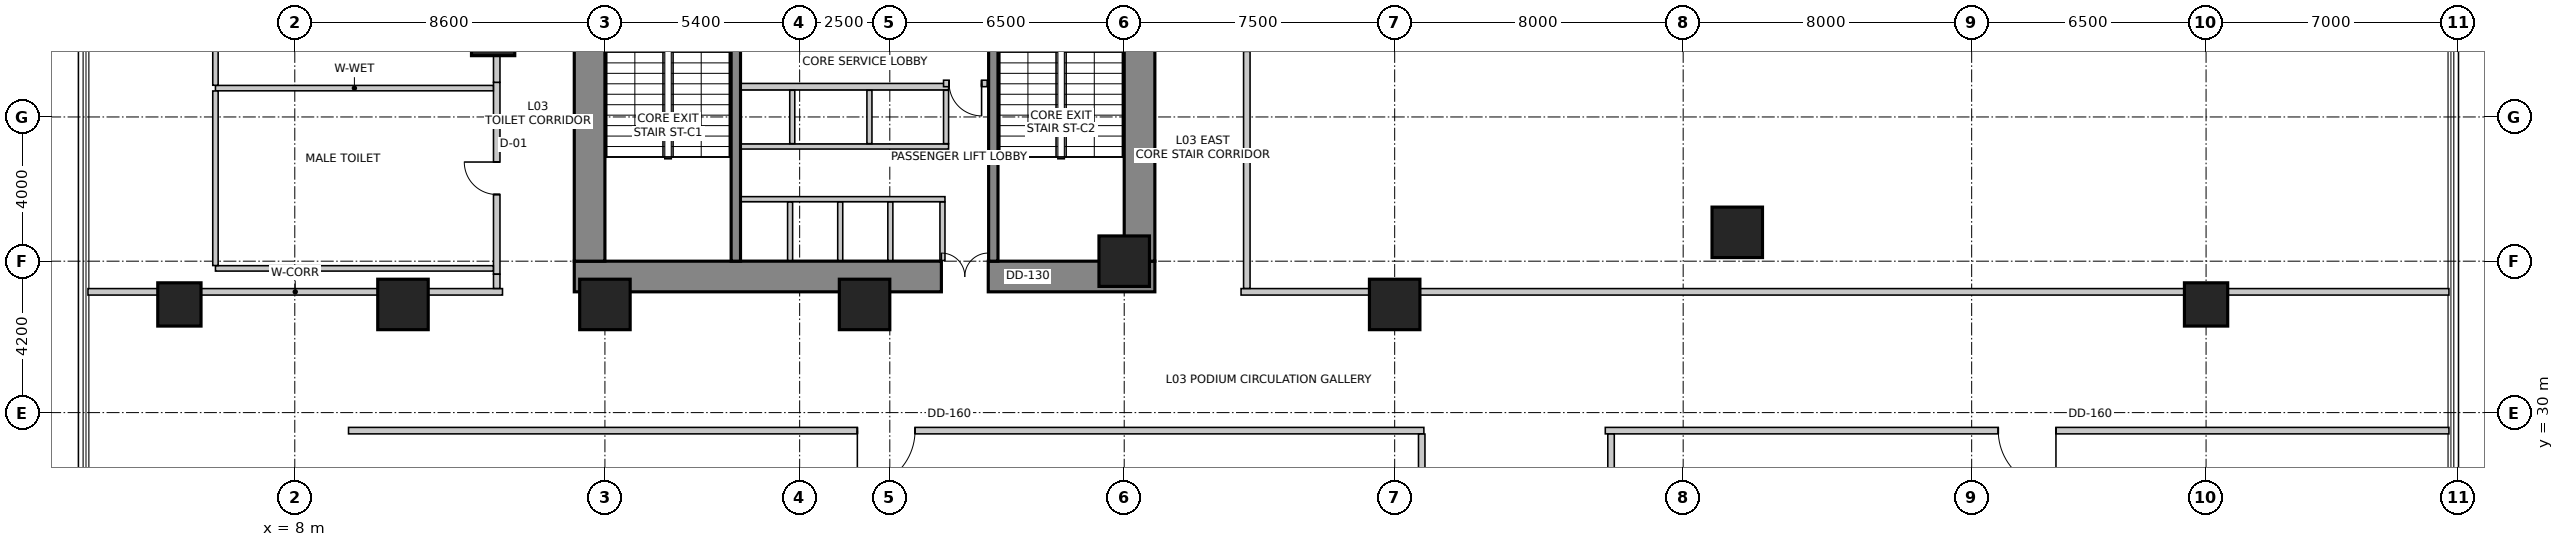
"""IFC4 building model, lengths in metres.
Left out: names, types, materials, properties, quantities, classifications, styles, units other than length and angle.
Written with IfcOpenShell. Run it as: python <this file> out.ifc"""

import sys

from ifc_helpers import new_model, si_unit, direction, frame, frame_2d, origin, origin_2d, place, context, subcontext, project, spatial, rectangle, extrude, source, transform, mapped, element, fill, save


model = new_model("IFC4")
c1 = context("Model", 3, precision=1e-05, world=origin(), true_north=direction((0.0, 1.0)))
c2 = subcontext(c1, "Body", "Model", "MODEL_VIEW")
j1 = project(units=[si_unit("LENGTHUNIT", "METRE"), si_unit("PLANEANGLEUNIT", "RADIAN")], contexts=[c1])
p1 = place(None, origin())
s1 = spatial("IfcSite", under=j1, at=p1, CompositionType="ELEMENT")
p2 = place(p1, origin())
s2 = spatial("IfcBuilding", under=s1, at=p2, CompositionType="ELEMENT")
p3 = place(p2, frame((0.0, 0.0, 11.2)))
s3 = spatial("IfcBuildingStorey", under=s2, at=p3, CompositionType="ELEMENT", Elevation=11.2)
p4 = place(p3, frame((15.75, 33.775, 0.0), z_axis=(0.0, 0.0, 1.0), x_axis=(1.0, 0.0, 0.0)))
e1 = element("IfcWall", 1, at=p4, inside=s3, PredefinedType="SHEAR", context=c2, shape_type="SweptSolid", body=[
    extrude(rectangle(XDim=16.1, YDim=0.85, at=frame_2d((8.05, 0.0))), origin(), (0.0, 0.0, 1.0), 5.2),
])
m1 = source(origin(), c2, "Body", "SweptSolid", [
    extrude(rectangle(XDim=1.3, YDim=2.15, at=frame_2d((0.65, 1.075))), frame((0.0, 0.435, 0.0), z_axis=(0.0, -1.0, 0.0), x_axis=(1.0, 0.0, 0.0)), (0.0, 0.0, 1.0), 0.87),
])
p5 = place(p4, frame((10.18, 0.0, 0.0)))
e2 = element("IfcOpeningElement", 2, at=p5, cuts=e1, PredefinedType="OPENING", context=c2, shape_type="MappedRepresentation", body=[
    mapped(m1, transform((0.0, 0.0, 0.0), scale=1.0)),
])
p6 = place(p3, frame((16.175, 34.2, 0.0), z_axis=(0.0, 0.0, 1.0), x_axis=(0.0, 1.0, 0.0)))
e3 = element("IfcWall", 3, at=p6, inside=s3, PredefinedType="SHEAR", context=c2, shape_type="SweptSolid", body=[
    extrude(rectangle(XDim=11.4, YDim=0.85, at=frame_2d((5.7, 0.0))), origin(), (0.0, 0.0, 1.0), 5.2),
])
m2 = source(origin(), c2, "Body", "SweptSolid", [
    extrude(rectangle(XDim=1.1, YDim=2.15, at=frame_2d((0.55, 1.075))), frame((0.0, 0.435, 0.0), z_axis=(0.0, -1.0, 0.0), x_axis=(1.0, 0.0, 0.0)), (0.0, 0.0, 1.0), 0.87),
])
p7 = place(p6, frame((7.15, 0.0, 0.0)))
e4 = element("IfcOpeningElement", 4, at=p7, cuts=e3, PredefinedType="OPENING", context=c2, shape_type="MappedRepresentation", body=[
    mapped(m2, transform((0.0, 0.0, 0.0), scale=1.0)),
])
p8 = place(p3, frame((31.425, 34.2, 0.0), z_axis=(0.0, 0.0, 1.0), x_axis=(0.0, 1.0, 0.0)))
e5 = element("IfcWall", 5, at=p8, inside=s3, PredefinedType="SHEAR", context=c2, shape_type="SweptSolid", body=[
    extrude(rectangle(XDim=11.4, YDim=0.85, at=frame_2d((5.7, 0.0))), origin(), (0.0, 0.0, 1.0), 5.2),
])
p9 = place(p8, frame((7.35, 0.0, 0.0)))
e6 = element("IfcOpeningElement", 6, at=p9, cuts=e5, PredefinedType="OPENING", context=c2, shape_type="MappedRepresentation", body=[
    mapped(m2, transform((0.0, 0.0, 0.0), scale=1.0)),
])
p10 = place(p3, frame((20.23, 34.2, 0.0), z_axis=(0.0, 0.0, 1.0), x_axis=(0.0, 1.0, 0.0)))
e7 = element("IfcWall", 7, at=p10, inside=s3, PredefinedType="SHEAR", context=c2, shape_type="SweptSolid", body=[
    extrude(rectangle(XDim=9.06, YDim=0.26, at=frame_2d((4.53, 0.0))), origin(), (0.0, 0.0, 1.0), 5.2),
])
m3 = source(origin(), c2, "Body", "SweptSolid", [
    extrude(rectangle(XDim=1.1, YDim=2.15, at=frame_2d((0.55, 1.075))), frame((0.0, 0.14, 0.0), z_axis=(0.0, -1.0, 0.0), x_axis=(1.0, 0.0, 0.0)), (0.0, 0.0, 1.0), 0.28),
])
p11 = place(p10, frame((7.45, 0.0, 0.0)))
e8 = element("IfcOpeningElement", 8, at=p11, cuts=e7, PredefinedType="OPENING", context=c2, shape_type="MappedRepresentation", body=[
    mapped(m3, transform((0.0, 0.0, 0.0), scale=1.0)),
])
p12 = place(p3, frame((27.37, 34.2, 0.0), z_axis=(0.0, 0.0, 1.0), x_axis=(0.0, 1.0, 0.0)))
e9 = element("IfcWall", 9, at=p12, inside=s3, PredefinedType="SHEAR", context=c2, shape_type="SweptSolid", body=[
    extrude(rectangle(XDim=9.06, YDim=0.26, at=frame_2d((4.53, 0.0))), origin(), (0.0, 0.0, 1.0), 5.2),
])
p13 = place(p12, frame((7.45, 0.0, 0.0)))
e10 = element("IfcOpeningElement", 10, at=p13, cuts=e9, PredefinedType="OPENING", context=c2, shape_type="MappedRepresentation", body=[
    mapped(m3, transform((0.0, 0.0, 0.0), scale=1.0)),
])
m4 = source(origin(), c2, "Body", "SweptSolid", [
    extrude(rectangle(XDim=1.2, YDim=1.2, at=origin_2d()), origin(), (0.0, 0.0, 1.0), 5.2),
])
p14 = place(p3, frame((4.8, 33.0, 0.0), z_axis=(0.0, 0.0, 1.0), x_axis=(1.0, 0.0, 0.0)))
e11 = element("IfcColumn", 11, at=p14, inside=s3, PredefinedType="COLUMN", context=c2, shape_type="MappedRepresentation", body=[
    mapped(m4, transform((0.0, 0.0, 0.0), scale=1.0)),
])
m5 = source(origin(), c2, "Body", "SweptSolid", [
    extrude(rectangle(XDim=1.4, YDim=1.4, at=origin_2d()), origin(), (0.0, 0.0, 1.0), 5.2),
])
for number, where, z_axis, x_axis in (
    (12, (11.0, 33.0, 0.0), (0.0, 0.0, 1.0), (1.0, 0.0, 0.0)),
    (13, (16.6, 33.0, 0.0), (0.0, 0.0, 1.0), (1.0, 0.0, 0.0)),
    (14, (23.8, 33.0, 0.0), (0.0, 0.0, 1.0), (1.0, 0.0, 0.0)),
    (15, (31.0, 34.2, 0.0), (0.0, 0.0, 1.0), (1.0, 0.0, 0.0)),
    (16, (38.5, 33.0, 0.0), (0.0, 0.0, 1.0), (1.0, 0.0, 0.0)),
    (17, (48.0, 35.0, 0.0), (0.0, 0.0, 1.0), (1.0, 0.0, 0.0)),
):
    element("IfcColumn", number, at=place(p3, frame(where, z_axis=z_axis, x_axis=x_axis)), inside=s3, PredefinedType="COLUMN", context=c2, shape_type="MappedRepresentation", body=[
        mapped(m5, transform((0.0, 0.0, 0.0), scale=1.0)),
    ])
for number, where, z_axis, x_axis in (
    (18, (61.0, 33.0, 0.0), (0.0, 0.0, 1.0), (1.0, 0.0, 0.0)),
    (19, (13.5, 40.5, 0.0), (0.0, 0.0, 1.0), (1.0, 0.0, 0.0)),
):
    element("IfcColumn", number, at=place(p3, frame(where, z_axis=z_axis, x_axis=x_axis)), inside=s3, PredefinedType="COLUMN", context=c2, shape_type="MappedRepresentation", body=[
        mapped(m4, transform((0.0, 0.0, 0.0), scale=1.0)),
    ])
p15 = place(p3, frame((20.38, 35.92, 0.0), z_axis=(0.0, 0.0, 1.0), x_axis=(1.0, 0.0, 0.0)))
e20 = element("IfcWall", 20, at=p15, inside=s3, PredefinedType="SOLIDWALL", context=c2, shape_type="SweptSolid", body=[
    extrude(rectangle(XDim=5.65, YDim=0.14, at=frame_2d((2.825, 0.0))), origin(), (0.0, 0.0, 1.0), 4.9),
])
for number, where, z_axis, x_axis in (
    (21, (25.96, 34.22, 0.0), (0.0, 0.0, 1.0), (0.0, 1.0, 0.0)),
    (22, (21.735, 34.22, 0.0), (0.0, 0.0, 1.0), (0.0, 1.0, 0.0)),
    (23, (23.125, 34.22, 0.0), (0.0, 0.0, 1.0), (0.0, 1.0, 0.0)),
    (24, (24.515, 34.22, 0.0), (0.0, 0.0, 1.0), (0.0, 1.0, 0.0)),
):
    element("IfcWall", number, at=place(p3, frame(where, z_axis=z_axis, x_axis=x_axis)), inside=s3, PredefinedType="SOLIDWALL", context=c2, shape_type="SweptSolid", body=[
        extrude(rectangle(XDim=1.62, YDim=0.14, at=frame_2d((0.81, 0.0))), origin(), (0.0, 0.0, 1.0), 4.9),
    ])
p16 = place(p3, frame((20.38, 37.38, 0.0), z_axis=(0.0, 0.0, 1.0), x_axis=(1.0, 0.0, 0.0)))
e25 = element("IfcWall", 25, at=p16, inside=s3, PredefinedType="SOLIDWALL", context=c2, shape_type="SweptSolid", body=[
    extrude(rectangle(XDim=5.75, YDim=0.14, at=frame_2d((2.875, 0.0))), origin(), (0.0, 0.0, 1.0), 4.9),
])
p17 = place(p3, frame((20.38, 39.04, 0.0), z_axis=(0.0, 0.0, 1.0), x_axis=(1.0, 0.0, 0.0)))
e26 = element("IfcWall", 26, at=p17, inside=s3, PredefinedType="SOLIDWALL", context=c2, shape_type="SweptSolid", body=[
    extrude(rectangle(XDim=5.75, YDim=0.18, at=frame_2d((2.875, 0.0))), origin(), (0.0, 0.0, 1.0), 4.9),
])
for number, where, z_axis, x_axis in (
    (27, (26.06, 37.46, 0.0), (0.0, 0.0, 1.0), (0.0, 1.0, 0.0)),
    (28, (21.795, 37.46, 0.0), (0.0, 0.0, 1.0), (0.0, 1.0, 0.0)),
    (29, (23.935, 37.46, 0.0), (0.0, 0.0, 1.0), (0.0, 1.0, 0.0)),
):
    element("IfcWall", number, at=place(p3, frame(where, z_axis=z_axis, x_axis=x_axis)), inside=s3, PredefinedType="SOLIDWALL", context=c2, shape_type="SweptSolid", body=[
        extrude(rectangle(XDim=1.48, YDim=0.14, at=frame_2d((0.74, 0.0))), origin(), (0.0, 0.0, 1.0), 4.9),
    ])
p18 = place(p3, frame((27.2, 39.13, 0.0), z_axis=(0.0, 0.0, 1.0), x_axis=(-1.0, 0.0, 0.0)))
e30 = element("IfcWall", 30, at=p18, inside=s3, PredefinedType="PARTITIONING", context=c2, shape_type="SweptSolid", body=[
    extrude(rectangle(XDim=1.21, YDim=0.18, at=frame_2d((0.605, 0.0))), origin(), (0.0, 0.0, 1.0), 4.9),
])
m6 = source(origin(), c2, "Body", "SweptSolid", [
    extrude(rectangle(XDim=0.9, YDim=2.15, at=frame_2d((0.45, 1.075))), frame((0.0, 0.1, 0.0), z_axis=(0.0, -1.0, 0.0), x_axis=(1.0, 0.0, 0.0)), (0.0, 0.0, 1.0), 0.2),
])
p19 = place(p18, frame((0.155, 0.0, 0.0)))
e31 = element("IfcOpeningElement", 31, at=p19, cuts=e30, PredefinedType="OPENING", context=c2, shape_type="MappedRepresentation", body=[
    mapped(m6, transform((0.0, 0.0, 0.0), scale=1.0)),
])
p20 = place(p3, frame((2.265, 33.35, 0.0), z_axis=(0.0, 0.0, 1.0), x_axis=(1.0, 0.0, 0.0)))
e32 = element("IfcWall", 32, at=p20, inside=s3, PredefinedType="PARTITIONING", context=c2, shape_type="SweptSolid", body=[
    extrude(rectangle(XDim=11.495, YDim=0.18, at=frame_2d((5.748, 0.0))), origin(), (0.0, 0.0, 1.0), 3.692),
])
p21 = place(p3, frame((39.31, 29.5, 0.0), z_axis=(0.0, 0.0, 1.0), x_axis=(-1.0, 0.0, 0.0)))
e33 = element("IfcWall", 33, at=p21, inside=s3, PredefinedType="PARTITIONING", context=c2, shape_type="SweptSolid", body=[
    extrude(rectangle(XDim=29.82, YDim=0.18, at=frame_2d((14.91, 0.0))), origin(), (0.0, 0.0, 1.0), 4.03),
])
m7 = source(origin(), c2, "Body", "SweptSolid", [
    extrude(rectangle(XDim=1.6, YDim=2.15, at=frame_2d((0.8, 1.075))), frame((0.0, 0.1, 0.0), z_axis=(0.0, -1.0, 0.0), x_axis=(1.0, 0.0, 0.0)), (0.0, 0.0, 1.0), 0.2),
])
p22 = place(p21, frame((14.11, 0.0, 0.0)))
e34 = element("IfcOpeningElement", 34, at=p22, cuts=e33, PredefinedType="OPENING", context=c2, shape_type="MappedRepresentation", body=[
    mapped(m7, transform((0.0, 0.0, 0.0), scale=1.0)),
])
p23 = place(p3, frame((67.735, 29.5, 0.0), z_axis=(0.0, 0.0, 1.0), x_axis=(-1.0, 0.0, 0.0)))
e35 = element("IfcWall", 35, at=p23, inside=s3, PredefinedType="PARTITIONING", context=c2, shape_type="SweptSolid", body=[
    extrude(rectangle(XDim=23.395, YDim=0.18, at=frame_2d((11.698, 0.0))), origin(), (0.0, 0.0, 1.0), 3.092),
])
p24 = place(p23, frame((10.897, 0.0, 0.0)))
e36 = element("IfcOpeningElement", 36, at=p24, cuts=e35, PredefinedType="OPENING", context=c2, shape_type="MappedRepresentation", body=[
    mapped(m7, transform((0.0, 0.0, 0.0), scale=1.0)),
])
p25 = place(p3, frame((34.24, 33.35, 0.0), z_axis=(0.0, 0.0, 1.0), x_axis=(1.0, 0.0, 0.0)))
e37 = element("IfcWall", 37, at=p25, inside=s3, PredefinedType="PARTITIONING", context=c2, shape_type="SweptSolid", body=[
    extrude(rectangle(XDim=33.495, YDim=0.18, at=frame_2d((16.748, 0.0))), origin(), (0.0, 0.0, 1.0), 3.092),
])
p26 = place(p3, frame((39.25, 14.52, 0.0), z_axis=(0.0, 0.0, 1.0), x_axis=(0.0, 1.0, 0.0)))
e38 = element("IfcWall", 38, at=p26, inside=s3, PredefinedType="PARTITIONING", context=c2, shape_type="SweptSolid", body=[
    extrude(rectangle(XDim=14.886, YDim=0.18, at=frame_2d((7.443, 0.0))), origin(), (0.0, 0.0, 1.0), 3.692),
])
p27 = place(p3, frame((44.5, 29.406, 0.0), z_axis=(0.0, 0.0, 1.0), x_axis=(0.0, -1.0, 0.0)))
e39 = element("IfcWall", 39, at=p27, inside=s3, PredefinedType="PARTITIONING", context=c2, shape_type="SweptSolid", body=[
    extrude(rectangle(XDim=15.006, YDim=0.18, at=frame_2d((7.503, 0.0))), origin(), (0.0, 0.0, 1.0), 3.692),
])
p28 = place(p3, frame((13.6, 33.84, 0.0), z_axis=(0.0, 0.0, 1.0), x_axis=(0.0, 1.0, 0.0)))
e40 = element("IfcWall", 40, at=p28, inside=s3, PredefinedType="PARTITIONING", context=c2, shape_type="SweptSolid", body=[
    extrude(rectangle(XDim=5.32, YDim=0.18, at=frame_2d((2.66, 0.0))), origin(), (0.0, 0.0, 1.0), 4.9),
])
p29 = place(p28, frame((2.21, 0.0, 0.0)))
e41 = element("IfcOpeningElement", 41, at=p29, cuts=e40, PredefinedType="OPENING", context=c2, shape_type="MappedRepresentation", body=[
    mapped(m6, transform((0.0, 0.0, 0.0), scale=1.0)),
])
p30 = place(p3, frame((13.6, 39.162, 0.0), z_axis=(0.0, 0.0, 1.0), x_axis=(0.0, 1.0, 0.0)))
e42 = element("IfcWall", 42, at=p30, inside=s3, PredefinedType="PARTITIONING", context=c2, shape_type="SweptSolid", body=[
    extrude(rectangle(XDim=4.998, YDim=0.18, at=frame_2d((2.499, 0.0))), origin(), (0.0, 0.0, 1.0), 3.942),
])
p31 = place(p30, frame((3.33, 0.0, 0.0)))
e43 = element("IfcOpeningElement", 43, at=p31, cuts=e42, PredefinedType="OPENING", context=c2, shape_type="MappedRepresentation", body=[
    mapped(m6, transform((0.0, 0.0, 0.0), scale=1.0)),
])
p32 = place(p3, frame((13.6, 33.444, 0.0), z_axis=(0.0, 0.0, 1.0), x_axis=(0.0, 1.0, 0.0)))
e44 = element("IfcWall", 44, at=p32, inside=s3, PredefinedType="PARTITIONING", context=c2, shape_type="SweptSolid", body=[
    extrude(rectangle(XDim=0.394, YDim=0.18, at=frame_2d((0.197, 0.0))), origin(), (0.0, 0.0, 1.0), 4.9),
])
p33 = place(p3, frame((34.4, 48.0, 0.0), z_axis=(0.0, 0.0, 1.0), x_axis=(0.0, -1.0, 0.0)))
e45 = element("IfcWall", 45, at=p33, inside=s3, PredefinedType="PARTITIONING", context=c2, shape_type="SweptSolid", body=[
    extrude(rectangle(XDim=14.556, YDim=0.18, at=frame_2d((7.278, 0.0))), origin(), (0.0, 0.0, 1.0), 3.942),
])
m8 = source(origin(), c2, "Body", "SweptSolid", [
    extrude(rectangle(XDim=1.4, YDim=2.15, at=frame_2d((0.7, 1.075))), frame((0.0, 0.1, 0.0), z_axis=(0.0, -1.0, 0.0), x_axis=(1.0, 0.0, 0.0)), (0.0, 0.0, 1.0), 0.2),
])
p34 = place(p33, frame((6.578, 0.0, 0.0)))
e46 = element("IfcOpeningElement", 46, at=p34, cuts=e45, PredefinedType="OPENING", context=c2, shape_type="MappedRepresentation", body=[
    mapped(m8, transform((0.0, 0.0, 0.0), scale=1.0)),
])
for number, where, z_axis, x_axis in (
    (47, (5.8, 39.0, 0.0), (0.0, 0.0, 1.0), (1.0, 0.0, 0.0)),
    (48, (13.506, 34.0, 0.0), (0.0, 0.0, 1.0), (-1.0, 0.0, 0.0)),
):
    element("IfcWall", number, at=place(p3, frame(where, z_axis=z_axis, x_axis=x_axis)), inside=s3, PredefinedType="PARTITIONING", context=c2, shape_type="SweptSolid", body=[
        extrude(rectangle(XDim=7.706, YDim=0.15, at=frame_2d((3.853, 0.0))), origin(), (0.0, 0.0, 1.0), 3.942),
    ])
p35 = place(p3, frame((5.8, 34.079, 0.0), z_axis=(0.0, 0.0, 1.0), x_axis=(0.0, 1.0, 0.0)))
e49 = element("IfcWall", 49, at=p35, inside=s3, PredefinedType="PARTITIONING", context=c2, shape_type="SweptSolid", body=[
    extrude(rectangle(XDim=4.842, YDim=0.15, at=frame_2d((2.421, 0.0))), origin(), (0.0, 0.0, 1.0), 4.9),
])
p36 = place(p3, frame((5.8, 39.079, 0.0), z_axis=(0.0, 0.0, 1.0), x_axis=(0.0, 1.0, 0.0)))
e50 = element("IfcWall", 50, at=p36, inside=s3, PredefinedType="PARTITIONING", context=c2, shape_type="SweptSolid", body=[
    extrude(rectangle(XDim=4.921, YDim=0.15, at=frame_2d((2.46, 0.0))), origin(), (0.0, 0.0, 1.0), 4.9),
])
m9 = source(origin(), c2, "Body", "SweptSolid", [
    extrude(rectangle(XDim=1.3, YDim=2.15, at=frame_2d((0.65, 1.075))), frame((0.0, 0.025, 0.0), z_axis=(0.0, -1.0, 0.0), x_axis=(1.0, 0.0, 0.0)), (0.0, 0.0, 1.0), 0.05),
])
p37 = place(p5, origin())
e51 = element("IfcDoor", 51, at=p37, inside=s3, OperationType="DOUBLE_DOOR_SINGLE_SWING", PredefinedType="DOOR", context=c2, shape_type="MappedRepresentation", body=[
    mapped(m9, transform((0.0, 0.0, 0.0), scale=1.0)),
])
fill(e2, e51)
m10 = source(origin(), c2, "Body", "SweptSolid", [
    extrude(rectangle(XDim=0.9, YDim=2.15, at=frame_2d((0.45, 1.075))), frame((0.0, 0.025, 0.0), z_axis=(0.0, -1.0, 0.0), x_axis=(1.0, 0.0, 0.0)), (0.0, 0.0, 1.0), 0.05),
])
p38 = place(p19, origin())
e52 = element("IfcDoor", 52, at=p38, inside=s3, OperationType="SINGLE_SWING_LEFT", PredefinedType="DOOR", context=c2, shape_type="MappedRepresentation", body=[
    mapped(m10, transform((0.0, 0.0, 0.0), scale=1.0)),
])
fill(e31, e52)
m11 = source(origin(), c2, "Body", "SweptSolid", [
    extrude(rectangle(XDim=0.9, YDim=2.15, at=frame_2d((0.45, 1.075))), frame((0.0, 0.025, 0.0), z_axis=(0.0, -1.0, 0.0), x_axis=(1.0, 0.0, 0.0)), (0.0, 0.0, 1.0), 0.05),
])
p39 = place(p29, origin())
e53 = element("IfcDoor", 53, at=p39, inside=s3, OperationType="SINGLE_SWING_RIGHT", PredefinedType="DOOR", context=c2, shape_type="MappedRepresentation", body=[
    mapped(m11, transform((0.0, 0.0, 0.0), scale=1.0)),
])
fill(e41, e53)
m12 = source(origin(), c2, "Body", "SweptSolid", [
    extrude(rectangle(XDim=1.6, YDim=2.15, at=frame_2d((0.8, 1.075))), frame((0.0, 0.025, 0.0), z_axis=(0.0, -1.0, 0.0), x_axis=(1.0, 0.0, 0.0)), (0.0, 0.0, 1.0), 0.05),
])
p40 = place(p22, origin())
e54 = element("IfcDoor", 54, at=p40, inside=s3, OperationType="SINGLE_SWING_RIGHT", PredefinedType="DOOR", context=c2, shape_type="MappedRepresentation", body=[
    mapped(m12, transform((0.0, 0.0, 0.0), scale=1.0)),
])
fill(e34, e54)
p41 = place(p24, origin())
e55 = element("IfcDoor", 55, at=p41, inside=s3, OperationType="SINGLE_SWING_LEFT", PredefinedType="DOOR", context=c2, shape_type="MappedRepresentation", body=[
    mapped(m12, transform((0.0, 0.0, 0.0), scale=1.0)),
])
fill(e36, e55)
save(model, sys.argv[1])
